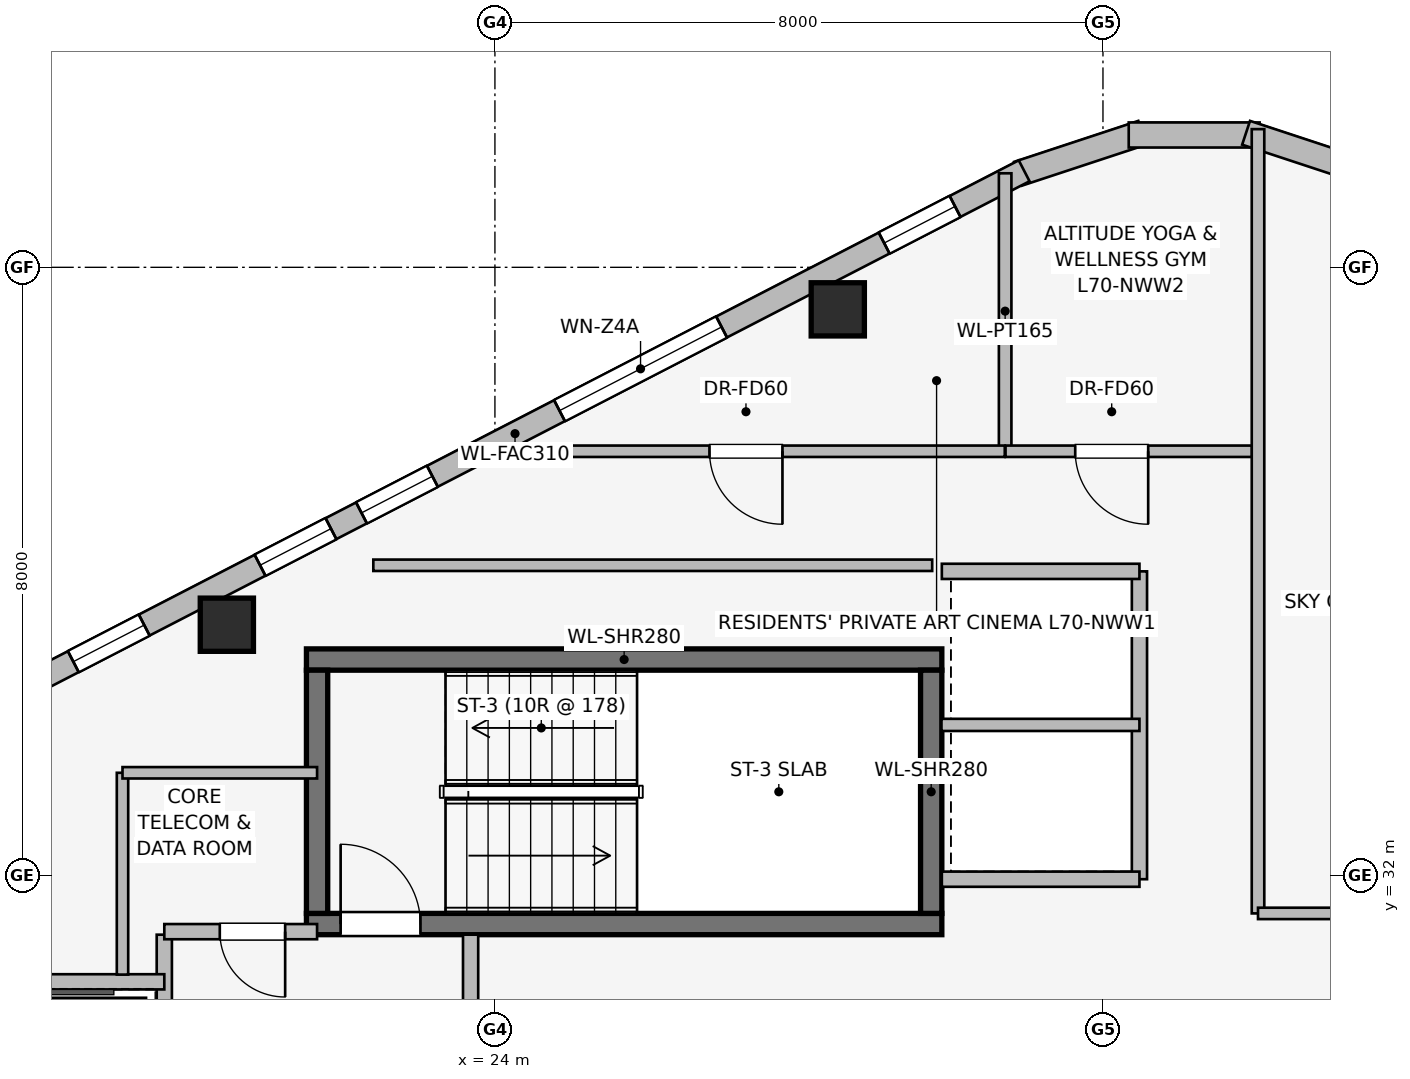
"""IFC4 building model, lengths in metres.
Left out: names, types, materials, properties, quantities, classifications, styles, units other than length and angle.
Written with IfcOpenShell. Run it as: python <this file> out.ifc"""

import sys

from ifc_helpers import new_model, si_unit, direction, frame, frame_2d, origin, origin_2d, place, context, subcontext, project, spatial, rectangle, extrude, element, fill, save


model = new_model("IFC4")
c1 = context("Model", 3, precision=1e-05, world=origin(), true_north=direction((0.0, 1.0)))
c2 = subcontext(c1, "Body", "Model", "MODEL_VIEW")
j1 = project(units=[si_unit("LENGTHUNIT", "METRE"), si_unit("PLANEANGLEUNIT", "RADIAN")], contexts=[c1])
p1 = place(None, origin())
s1 = spatial("IfcSite", under=j1, at=p1, CompositionType="ELEMENT")
p2 = place(p1, origin())
s2 = spatial("IfcBuilding", under=s1, at=p2, CompositionType="ELEMENT")
p3 = place(p2, frame((0.0, 0.0, 256.1)))
s3 = spatial("IfcBuildingStorey", under=s2, at=p3, CompositionType="ELEMENT", Elevation=256.1)
p4 = place(p3, frame((21.52, 31.36, 0.0), z_axis=(0.0, 0.0, 1.0), x_axis=(1.0, 0.0, 0.0)))
e1 = element("IfcWall", 1, at=p4, inside=s3, PredefinedType="SHEAR", context=c2, shape_type="SweptSolid", body=[
    extrude(rectangle(XDim=8.36, YDim=0.28, at=frame_2d((4.18, 0.0))), origin(), (0.0, 0.0, 1.0), 3.55),
])
p5 = place(p4, frame((0.45, 0.0, 0.0)))
e2 = element("IfcOpeningElement", 2, at=p5, cuts=e1, PredefinedType="OPENING", context=c2, shape_type="SweptSolid", body=[
    extrude(rectangle(XDim=1.05, YDim=2.0, at=frame_2d((0.525, 1.0))), frame((0.0, 0.15, 0.0), z_axis=(0.0, -1.0, 0.0), x_axis=(1.0, 0.0, 0.0)), (0.0, 0.0, 1.0), 0.3),
])
p6 = place(p3, frame((29.88, 34.84, 0.0), z_axis=(0.0, 0.0, 1.0), x_axis=(-1.0, 0.0, 0.0)))
e3 = element("IfcWall", 3, at=p6, inside=s3, PredefinedType="SHEAR", context=c2, shape_type="SweptSolid", body=[
    extrude(rectangle(XDim=8.36, YDim=0.28, at=frame_2d((4.18, 0.0))), origin(), (0.0, 0.0, 1.0), 3.55),
])
for number, where, z_axis, x_axis in (
    (4, (21.66, 34.7, 0.0), (0.0, 0.0, 1.0), (0.0, -1.0, 0.0)),
    (5, (29.74, 31.5, 0.0), (0.0, 0.0, 1.0), (0.0, 1.0, 0.0)),
):
    element("IfcWall", number, at=place(p3, frame(where, z_axis=z_axis, x_axis=x_axis)), inside=s3, PredefinedType="SHEAR", context=c2, shape_type="SweptSolid", body=[
        extrude(rectangle(XDim=3.2, YDim=0.28, at=frame_2d((1.6, 0.0))), origin(), (0.0, 0.0, 1.0), 3.55),
    ])
for number, where, z_axis, x_axis in (
    (6, (28.511, 39.447, 0.0), (0.0, 0.0, 1.0), (1.0, 0.0, 0.0)),
    (7, (20.473, 35.298, 0.0), (0.0, 0.0, 1.0), (1.0, 0.0, 0.0)),
):
    element("IfcColumn", number, at=place(p3, frame(where, z_axis=z_axis, x_axis=x_axis)), inside=s3, PredefinedType="COLUMN", context=c2, shape_type="SweptSolid", body=[
        extrude(rectangle(XDim=0.7, YDim=0.7, at=origin_2d()), origin(), (0.0, 0.0, 1.0), 3.55),
    ])
p7 = place(p3, frame((30.882, 41.231, 0.0), z_axis=(0.0, 0.0, 1.0), x_axis=(0.949713440491, 0.313120393699, 0.0)))
e8 = element("IfcWall", 8, at=p7, inside=s3, PredefinedType="STANDARD", context=c2, shape_type="SweptSolid", body=[
    extrude(rectangle(XDim=1.722, YDim=0.33, at=frame_2d((0.861, 0.0))), origin(), (0.0, 0.0, 1.0), 3.29),
])
p8 = place(p3, frame((32.339, 41.741, 0.0), z_axis=(0.0, 0.0, 1.0), x_axis=(1.0, 0.0, 0.0)))
e9 = element("IfcWall", 9, at=p8, inside=s3, PredefinedType="STANDARD", context=c2, shape_type="SweptSolid", body=[
    extrude(rectangle(XDim=1.722, YDim=0.33, at=frame_2d((0.861, 0.0))), origin(), (0.0, 0.0, 1.0), 3.29),
])
p9 = place(p3, frame((33.883, 41.77, 0.0), z_axis=(0.0, 0.0, 1.0), x_axis=(0.949713440491, -0.313120393699, 0.0)))
e10 = element("IfcWall", 10, at=p9, inside=s3, PredefinedType="STANDARD", context=c2, shape_type="SweptSolid", body=[
    extrude(rectangle(XDim=1.722, YDim=0.33, at=frame_2d((0.861, 0.0))), origin(), (0.0, 0.0, 1.0), 3.29),
])
p10 = place(p3, frame((17.566, 34.354, 0.0), z_axis=(0.0, 0.0, 1.0), x_axis=(0.888581481622, 0.458718814218, 0.0)))
e11 = element("IfcWall", 11, at=p10, inside=s3, PredefinedType="STANDARD", context=c2, shape_type="SweptSolid", body=[
    extrude(rectangle(XDim=15.077, YDim=0.31, at=frame_2d((7.539, 0.0))), origin(), (0.0, 0.0, 1.0), 3.29),
])
p11 = place(p10, frame((0.998, 0.0, 0.75)))
e12 = element("IfcOpeningElement", 12, at=p11, cuts=e11, PredefinedType="OPENING", context=c2, shape_type="SweptSolid", body=[
    extrude(rectangle(XDim=1.05, YDim=1.4, at=frame_2d((0.525, 0.7))), frame((0.0, 0.165, 0.0), z_axis=(0.0, -1.0, 0.0), x_axis=(1.0, 0.0, 0.0)), (0.0, 0.0, 1.0), 0.33),
])
p12 = place(p10, frame((3.763, 0.0, 0.75)))
e13 = element("IfcOpeningElement", 13, at=p12, cuts=e11, PredefinedType="OPENING", context=c2, shape_type="SweptSolid", body=[
    extrude(rectangle(XDim=1.05, YDim=1.4, at=frame_2d((0.525, 0.7))), frame((0.0, 0.165, 0.0), z_axis=(0.0, -1.0, 0.0), x_axis=(1.0, 0.0, 0.0)), (0.0, 0.0, 1.0), 0.33),
])
p13 = place(p10, frame((5.265, 0.0, 0.75)))
e14 = element("IfcOpeningElement", 14, at=p13, cuts=e11, PredefinedType="OPENING", context=c2, shape_type="SweptSolid", body=[
    extrude(rectangle(XDim=1.05, YDim=1.4, at=frame_2d((0.525, 0.7))), frame((0.0, 0.165, 0.0), z_axis=(0.0, -1.0, 0.0), x_axis=(1.0, 0.0, 0.0)), (0.0, 0.0, 1.0), 0.33),
])
p14 = place(p10, frame((8.197, 0.0, 0.75)))
e15 = element("IfcOpeningElement", 15, at=p14, cuts=e11, PredefinedType="OPENING", context=c2, shape_type="SweptSolid", body=[
    extrude(rectangle(XDim=2.4, YDim=1.6, at=frame_2d((1.2, 0.8))), frame((0.0, 0.165, 0.0), z_axis=(0.0, -1.0, 0.0), x_axis=(1.0, 0.0, 0.0)), (0.0, 0.0, 1.0), 0.33),
])
p15 = place(p10, frame((13.004, 0.0, 0.75)))
e16 = element("IfcOpeningElement", 16, at=p15, cuts=e11, PredefinedType="OPENING", context=c2, shape_type="SweptSolid", body=[
    extrude(rectangle(XDim=1.05, YDim=1.4, at=frame_2d((0.525, 0.7))), frame((0.0, 0.165, 0.0), z_axis=(0.0, -1.0, 0.0), x_axis=(1.0, 0.0, 0.0)), (0.0, 0.0, 1.0), 0.33),
])
p16 = place(p3, frame((19.65, 25.68, 0.0), z_axis=(0.0, 0.0, 1.0), x_axis=(0.0, 1.0, 0.0)))
e17 = element("IfcWall", 17, at=p16, inside=s3, PredefinedType="PARTITIONING", context=c2, shape_type="SweptSolid", body=[
    extrude(rectangle(XDim=5.54, YDim=0.2, at=frame_2d((2.77, 0.0))), origin(), (0.0, 0.0, 1.0), 3.29),
])
p17 = place(p16, frame((0.62, 0.0, 0.0)))
e18 = element("IfcOpeningElement", 18, at=p17, cuts=e17, PredefinedType="OPENING", context=c2, shape_type="SweptSolid", body=[
    extrude(rectangle(XDim=1.1, YDim=2.2, at=frame_2d((0.55, 1.1))), frame((0.0, 0.11, 0.0), z_axis=(0.0, -1.0, 0.0), x_axis=(1.0, 0.0, 0.0)), (0.0, 0.0, 1.0), 0.22),
])
p18 = place(p16, frame((3.12, 0.0, 0.0)))
e19 = element("IfcOpeningElement", 19, at=p18, cuts=e17, PredefinedType="OPENING", context=c2, shape_type="SweptSolid", body=[
    extrude(rectangle(XDim=1.1, YDim=2.2, at=frame_2d((0.55, 1.1))), frame((0.0, 0.11, 0.0), z_axis=(0.0, -1.0, 0.0), x_axis=(1.0, 0.0, 0.0)), (0.0, 0.0, 1.0), 0.22),
])
p19 = place(p3, frame((23.68, 25.68, 0.0), z_axis=(0.0, 0.0, 1.0), x_axis=(0.0, 1.0, 0.0)))
e20 = element("IfcWall", 20, at=p19, inside=s3, PredefinedType="PARTITIONING", context=c2, shape_type="SweptSolid", body=[
    extrude(rectangle(XDim=5.54, YDim=0.2, at=frame_2d((2.77, 0.0))), origin(), (0.0, 0.0, 1.0), 3.29),
])
p20 = place(p19, frame((1.8, 0.0, 0.0)))
e21 = element("IfcOpeningElement", 21, at=p20, cuts=e20, PredefinedType="OPENING", context=c2, shape_type="SweptSolid", body=[
    extrude(rectangle(XDim=1.05, YDim=2.0, at=frame_2d((0.525, 1.0))), frame((0.0, 0.11, 0.0), z_axis=(0.0, -1.0, 0.0), x_axis=(1.0, 0.0, 0.0)), (0.0, 0.0, 1.0), 0.22),
])
p21 = place(p3, frame((21.66, 31.26, 0.0), z_axis=(0.0, 0.0, 1.0), x_axis=(-1.0, 0.0, 0.0)))
e22 = element("IfcWall", 22, at=p21, inside=s3, PredefinedType="PARTITIONING", context=c2, shape_type="SweptSolid", body=[
    extrude(rectangle(XDim=2.01, YDim=0.2, at=frame_2d((1.005, 0.0))), origin(), (0.0, 0.0, 1.0), 3.29),
])
p22 = place(p21, frame((0.42, 0.0, 0.0)))
e23 = element("IfcOpeningElement", 23, at=p22, cuts=e22, PredefinedType="OPENING", context=c2, shape_type="SweptSolid", body=[
    extrude(rectangle(XDim=0.86, YDim=2.0, at=frame_2d((0.43, 1.0))), frame((0.0, 0.11, 0.0), z_axis=(0.0, -1.0, 0.0), x_axis=(1.0, 0.0, 0.0)), (0.0, 0.0, 1.0), 0.22),
])
p23 = place(p3, frame((19.65, 30.6, 0.0), z_axis=(0.0, 0.0, 1.0), x_axis=(-1.0, 0.0, 0.0)))
e24 = element("IfcWall", 24, at=p23, inside=s3, PredefinedType="PARTITIONING", context=c2, shape_type="SweptSolid", body=[
    extrude(rectangle(XDim=2.5, YDim=0.2, at=frame_2d((1.25, 0.0))), origin(), (0.0, 0.0, 1.0), 2.19),
])
p24 = place(p3, frame((32.48, 31.95, 0.0), z_axis=(0.0, 0.0, 1.0), x_axis=(0.0, 1.0, 0.0)))
e25 = element("IfcWall", 25, at=p24, inside=s3, PredefinedType="PARTITIONING", context=c2, shape_type="SweptSolid", body=[
    extrude(rectangle(XDim=4.05, YDim=0.2, at=frame_2d((2.025, 0.0))), origin(), (0.0, 0.0, 1.0), 3.29),
])
for number, where, z_axis, x_axis in (
    (26, (29.88, 36.0, 0.0), (0.0, 0.0, 1.0), (1.0, 0.0, 0.0)),
    (27, (32.48, 31.95, 0.0), (0.0, 0.0, 1.0), (-1.0, 0.0, 0.0)),
):
    element("IfcWall", number, at=place(p3, frame(where, z_axis=z_axis, x_axis=x_axis)), inside=s3, PredefinedType="PARTITIONING", context=c2, shape_type="SweptSolid", body=[
        extrude(rectangle(XDim=2.6, YDim=0.2, at=frame_2d((1.3, 0.0))), origin(), (0.0, 0.0, 1.0), 3.29),
    ])
p25 = place(p3, frame((29.875, 33.98, 0.0), z_axis=(0.0, 0.0, 1.0), x_axis=(1.0, 0.0, 0.0)))
e28 = element("IfcWall", 28, at=p25, inside=s3, PredefinedType="PARTITIONING", context=c2, shape_type="SweptSolid", body=[
    extrude(rectangle(XDim=2.605, YDim=0.16, at=frame_2d((1.302, 0.0))), origin(), (0.0, 0.0, 1.0), 3.29),
])
p26 = place(p3, frame((19.1, 33.35, 0.0), z_axis=(0.0, 0.0, 1.0), x_axis=(0.0, -1.0, 0.0)))
e29 = element("IfcWall", 29, at=p26, inside=s3, PredefinedType="PARTITIONING", context=c2, shape_type="SweptSolid", body=[
    extrude(rectangle(XDim=2.655, YDim=0.15, at=frame_2d((1.328, 0.0))), origin(), (0.0, 0.0, 1.0), 3.29),
])
p27 = place(p3, frame((21.66, 33.35, 0.0), z_axis=(0.0, 0.0, 1.0), x_axis=(-1.0, 0.0, 0.0)))
e30 = element("IfcWall", 30, at=p27, inside=s3, PredefinedType="PARTITIONING", context=c2, shape_type="SweptSolid", body=[
    extrude(rectangle(XDim=2.56, YDim=0.15, at=frame_2d((1.28, 0.0))), origin(), (0.0, 0.0, 1.0), 3.29),
])
p28 = place(p3, frame((30.713, 37.61, 0.0), z_axis=(0.0, 0.0, 1.0), x_axis=(0.0, 1.0, 0.0)))
e31 = element("IfcWall", 31, at=p28, inside=s3, PredefinedType="PARTITIONING", context=c2, shape_type="SweptSolid", body=[
    extrude(rectangle(XDim=3.627, YDim=0.165, at=frame_2d((1.813, 0.0))), origin(), (0.0, 0.0, 1.0), 3.29),
])
p29 = place(p3, frame((30.708, 37.58, 0.0), z_axis=(0.0, 0.0, 1.0), x_axis=(-1.0, 0.0, 0.0)))
e32 = element("IfcWall", 32, at=p29, inside=s3, PredefinedType="PARTITIONING", context=c2, shape_type="SweptSolid", body=[
    extrude(rectangle(XDim=7.046, YDim=0.15, at=frame_2d((3.523, 0.0))), origin(), (0.0, 0.0, 1.0), 2.682),
])
p30 = place(p29, frame((2.925, 0.0, 0.0)))
e33 = element("IfcOpeningElement", 33, at=p30, cuts=e32, PredefinedType="OPENING", context=c2, shape_type="SweptSolid", body=[
    extrude(rectangle(XDim=0.96, YDim=2.0, at=frame_2d((0.48, 1.0))), frame((0.0, 0.085, 0.0), z_axis=(0.0, -1.0, 0.0), x_axis=(1.0, 0.0, 0.0)), (0.0, 0.0, 1.0), 0.17),
])
p31 = place(p3, frame((33.962, 37.58, 0.0), z_axis=(0.0, 0.0, 1.0), x_axis=(-1.0, 0.0, 0.0)))
e34 = element("IfcWall", 34, at=p31, inside=s3, PredefinedType="PARTITIONING", context=c2, shape_type="SweptSolid", body=[
    extrude(rectangle(XDim=3.244, YDim=0.15, at=frame_2d((1.622, 0.0))), origin(), (0.0, 0.0, 1.0), 3.29),
])
p32 = place(p31, frame((1.367, 0.0, 0.0)))
e35 = element("IfcOpeningElement", 35, at=p32, cuts=e34, PredefinedType="OPENING", context=c2, shape_type="SweptSolid", body=[
    extrude(rectangle(XDim=0.96, YDim=2.0, at=frame_2d((0.48, 1.0))), frame((0.0, 0.085, 0.0), z_axis=(0.0, -1.0, 0.0), x_axis=(1.0, 0.0, 0.0)), (0.0, 0.0, 1.0), 0.17),
])
p33 = place(p3, frame((34.04, 31.5, 0.0), z_axis=(0.0, 0.0, 1.0), x_axis=(0.0, 1.0, 0.0)))
e36 = element("IfcWall", 36, at=p33, inside=s3, PredefinedType="PARTITIONING", context=c2, shape_type="SweptSolid", body=[
    extrude(rectangle(XDim=10.318, YDim=0.165, at=frame_2d((5.159, 0.0))), origin(), (0.0, 0.0, 1.0), 3.29),
])
p34 = place(p3, frame((41.46, 31.5, 0.0), z_axis=(0.0, 0.0, 1.0), x_axis=(-1.0, 0.0, 0.0)))
e37 = element("IfcWall", 37, at=p34, inside=s3, PredefinedType="PARTITIONING", context=c2, shape_type="SweptSolid", body=[
    extrude(rectangle(XDim=7.42, YDim=0.15, at=frame_2d((3.71, 0.0))), origin(), (0.0, 0.0, 1.0), 3.29),
])
p35 = place(p34, frame((3.23, 0.0, 0.0)))
e38 = element("IfcOpeningElement", 38, at=p35, cuts=e37, PredefinedType="OPENING", context=c2, shape_type="SweptSolid", body=[
    extrude(rectangle(XDim=0.96, YDim=2.0, at=frame_2d((0.48, 1.0))), frame((0.0, 0.085, 0.0), z_axis=(0.0, -1.0, 0.0), x_axis=(1.0, 0.0, 0.0)), (0.0, 0.0, 1.0), 0.17),
])
p36 = place(p3, frame((29.753, 36.08, 0.0), z_axis=(0.0, 0.0, 1.0), x_axis=(-1.0, 0.0, 0.0)))
e39 = element("IfcWall", 39, at=p36, inside=s3, PredefinedType="PARTITIONING", context=c2, shape_type="SweptSolid", body=[
    extrude(rectangle(XDim=7.353, YDim=0.15, at=frame_2d((3.677, 0.0))), origin(), (0.0, 0.0, 1.0), 2.682),
])
p37 = place(p11, origin())
e40 = element("IfcWindow", 40, at=p37, inside=s3, PartitioningType="SINGLE_PANEL", PredefinedType="WINDOW", context=c2, shape_type="SweptSolid", body=[
    extrude(rectangle(XDim=1.05, YDim=1.4, at=frame_2d((0.525, 0.7))), frame((0.0, 0.03, 0.0), z_axis=(0.0, -1.0, 0.0), x_axis=(1.0, 0.0, 0.0)), (0.0, 0.0, 1.0), 0.06),
])
fill(e12, e40)
p38 = place(p12, origin())
e41 = element("IfcWindow", 41, at=p38, inside=s3, PartitioningType="SINGLE_PANEL", PredefinedType="WINDOW", context=c2, shape_type="SweptSolid", body=[
    extrude(rectangle(XDim=1.05, YDim=1.4, at=frame_2d((0.525, 0.7))), frame((0.0, 0.03, 0.0), z_axis=(0.0, -1.0, 0.0), x_axis=(1.0, 0.0, 0.0)), (0.0, 0.0, 1.0), 0.06),
])
fill(e13, e41)
p39 = place(p13, origin())
e42 = element("IfcWindow", 42, at=p39, inside=s3, PartitioningType="SINGLE_PANEL", PredefinedType="WINDOW", context=c2, shape_type="SweptSolid", body=[
    extrude(rectangle(XDim=1.05, YDim=1.4, at=frame_2d((0.525, 0.7))), frame((0.0, 0.03, 0.0), z_axis=(0.0, -1.0, 0.0), x_axis=(1.0, 0.0, 0.0)), (0.0, 0.0, 1.0), 0.06),
])
fill(e14, e42)
p40 = place(p14, origin())
e43 = element("IfcWindow", 43, at=p40, inside=s3, PartitioningType="SINGLE_PANEL", PredefinedType="WINDOW", context=c2, shape_type="SweptSolid", body=[
    extrude(rectangle(XDim=2.4, YDim=1.6, at=frame_2d((1.2, 0.8))), frame((0.0, 0.03, 0.0), z_axis=(0.0, -1.0, 0.0), x_axis=(1.0, 0.0, 0.0)), (0.0, 0.0, 1.0), 0.06),
])
fill(e15, e43)
p41 = place(p15, origin())
e44 = element("IfcWindow", 44, at=p41, inside=s3, PartitioningType="SINGLE_PANEL", PredefinedType="WINDOW", context=c2, shape_type="SweptSolid", body=[
    extrude(rectangle(XDim=1.05, YDim=1.4, at=frame_2d((0.525, 0.7))), frame((0.0, 0.03, 0.0), z_axis=(0.0, -1.0, 0.0), x_axis=(1.0, 0.0, 0.0)), (0.0, 0.0, 1.0), 0.06),
])
fill(e16, e44)
p42 = place(p5, origin())
e45 = element("IfcDoor", 45, at=p42, inside=s3, OperationType="SINGLE_SWING_LEFT", PredefinedType="DOOR", context=c2, shape_type="SweptSolid", body=[
    extrude(rectangle(XDim=1.05, YDim=2.0, at=frame_2d((0.525, 1.0))), frame((0.0, 0.025, 0.0), z_axis=(0.0, -1.0, 0.0), x_axis=(1.0, 0.0, 0.0)), (0.0, 0.0, 1.0), 0.05),
])
fill(e2, e45)
p43 = place(p22, origin())
e46 = element("IfcDoor", 46, at=p43, inside=s3, OperationType="SINGLE_SWING_LEFT", PredefinedType="DOOR", context=c2, shape_type="SweptSolid", body=[
    extrude(rectangle(XDim=0.86, YDim=2.0, at=frame_2d((0.43, 1.0))), frame((0.0, 0.025, 0.0), z_axis=(0.0, -1.0, 0.0), x_axis=(1.0, 0.0, 0.0)), (0.0, 0.0, 1.0), 0.05),
])
fill(e23, e46)
p44 = place(p30, origin())
e47 = element("IfcDoor", 47, at=p44, inside=s3, OperationType="SINGLE_SWING_LEFT", PredefinedType="DOOR", context=c2, shape_type="SweptSolid", body=[
    extrude(rectangle(XDim=0.96, YDim=2.0, at=frame_2d((0.48, 1.0))), frame((0.0, 0.025, 0.0), z_axis=(0.0, -1.0, 0.0), x_axis=(1.0, 0.0, 0.0)), (0.0, 0.0, 1.0), 0.05),
])
fill(e33, e47)
p45 = place(p32, origin())
e48 = element("IfcDoor", 48, at=p45, inside=s3, OperationType="SINGLE_SWING_LEFT", PredefinedType="DOOR", context=c2, shape_type="SweptSolid", body=[
    extrude(rectangle(XDim=0.96, YDim=2.0, at=frame_2d((0.48, 1.0))), frame((0.0, 0.025, 0.0), z_axis=(0.0, -1.0, 0.0), x_axis=(1.0, 0.0, 0.0)), (0.0, 0.0, 1.0), 0.05),
])
fill(e35, e48)
save(model, sys.argv[1])
